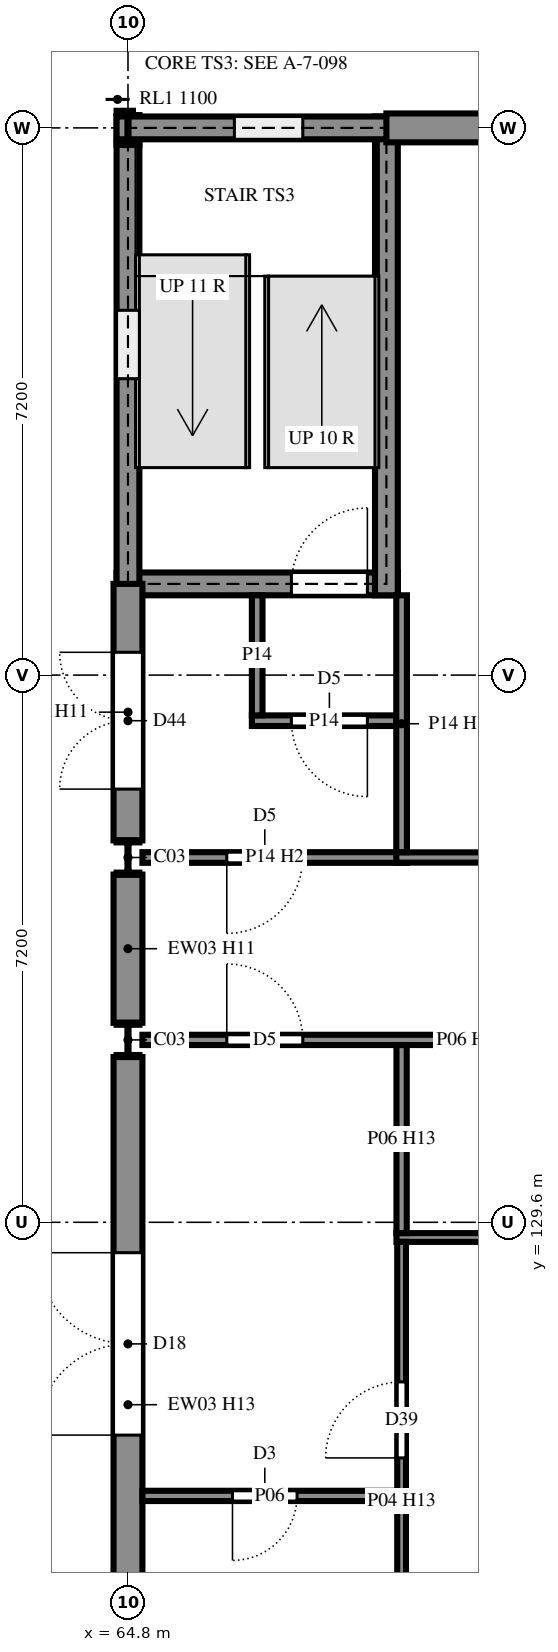
"""IFC4 building model, lengths in metres.
Left out: names, types, materials, properties, quantities, classifications, styles, units other than length and angle.
Written with IfcOpenShell. Run it as: python <this file> out.ifc"""

import sys

from ifc_helpers import new_model, si_unit, direction, frame, frame_2d, origin, origin_2d, place, context, subcontext, project, spatial, rectangle, i_section, extrude, element, fill, save


model = new_model("IFC4")
c1 = context("Model", 3, precision=1e-05, world=origin(), true_north=direction((0.0, 1.0)))
c2 = subcontext(c1, "Body", "Model", "MODEL_VIEW")
j1 = project(units=[si_unit("LENGTHUNIT", "METRE"), si_unit("PLANEANGLEUNIT", "RADIAN")], contexts=[c1])
p1 = place(None, origin())
s1 = spatial("IfcSite", under=j1, at=p1, CompositionType="ELEMENT")
p2 = place(p1, origin())
s2 = spatial("IfcBuilding", under=s1, at=p2, CompositionType="ELEMENT")
p3 = place(p2, frame((0.0, 0.0, 7.2)))
s3 = spatial("IfcBuildingStorey", under=s2, at=p3, CompositionType="ELEMENT", Elevation=7.2)
for number, where, z_axis, x_axis in (
    (1, (64.8, 132.0, 0.0), (0.0, 0.0, 1.0), (1.0, 0.0, 0.0)),
    (2, (64.8, 134.4, 0.0), (0.0, 0.0, 1.0), (1.0, 0.0, 0.0)),
    (3, (64.8, 144.0, 0.0), (0.0, 0.0, 1.0), (1.0, 0.0, 0.0)),
):
    element("IfcColumn", number, at=place(p3, frame(where, z_axis=z_axis, x_axis=x_axis)), inside=s3, PredefinedType="COLUMN", context=c2, shape_type="SweptSolid", body=[
        extrude(i_section(OverallWidth=0.3, OverallDepth=0.45, WebThickness=0.014, FlangeThickness=0.026, FilletRadius=0.027, at=origin_2d()), origin(), (0.0, 0.0, 1.0), 3.6),
    ])
p4 = place(p3, frame((64.65, 138.0, 0.0), z_axis=(0.0, 0.0, 1.0), x_axis=(1.0, 0.0, 0.0)))
e4 = element("IfcWall", 4, at=p4, inside=s3, PredefinedType="SHEAR", context=c2, shape_type="SweptSolid", body=[
    extrude(rectangle(XDim=3.7, YDim=0.3, at=frame_2d((1.85, 0.0))), origin(), (0.0, 0.0, 1.0), 3.6),
])
p5 = place(p4, frame((2.3, 0.0, 0.0)))
e5 = element("IfcOpeningElement", 5, at=p5, cuts=e4, PredefinedType="OPENING", context=c2, shape_type="SweptSolid", body=[
    extrude(rectangle(XDim=1.0, YDim=2.1, at=frame_2d((0.5, 1.05))), frame((0.0, 0.16, 0.0), z_axis=(0.0, -1.0, 0.0), x_axis=(1.0, 0.0, 0.0)), (0.0, 0.0, 1.0), 0.32),
])
p6 = place(p3, frame((68.2, 137.85, 0.0), z_axis=(0.0, 0.0, 1.0), x_axis=(0.0, 1.0, 0.0)))
e6 = element("IfcWall", 6, at=p6, inside=s3, PredefinedType="SHEAR", context=c2, shape_type="SweptSolid", body=[
    extrude(rectangle(XDim=6.3, YDim=0.3, at=frame_2d((3.15, 0.0))), origin(), (0.0, 0.0, 1.0), 3.6),
])
p7 = place(p3, frame((64.8, 144.15, 0.0), z_axis=(0.0, 0.0, 1.0), x_axis=(0.0, -1.0, 0.0)))
e7 = element("IfcWall", 7, at=p7, inside=s3, PredefinedType="SHEAR", context=c2, shape_type="SweptSolid", body=[
    extrude(rectangle(XDim=6.3, YDim=0.3, at=frame_2d((3.15, 0.0))), origin(), (0.0, 0.0, 1.0), 3.6),
])
p8 = place(p7, frame((2.55, 0.0, 0.6)))
e8 = element("IfcOpeningElement", 8, at=p8, cuts=e7, PredefinedType="OPENING", context=c2, shape_type="SweptSolid", body=[
    extrude(rectangle(XDim=0.9, YDim=2.1, at=frame_2d((0.45, 1.05))), frame((0.0, 0.16, 0.0), z_axis=(0.0, -1.0, 0.0), x_axis=(1.0, 0.0, 0.0)), (0.0, 0.0, 1.0), 0.32),
])
p9 = place(p3, frame((68.35, 144.0, 0.0), z_axis=(0.0, 0.0, 1.0), x_axis=(-1.0, 0.0, 0.0)))
e9 = element("IfcWall", 9, at=p9, inside=s3, PredefinedType="SHEAR", context=c2, shape_type="SweptSolid", body=[
    extrude(rectangle(XDim=3.7, YDim=0.3, at=frame_2d((1.85, 0.0))), origin(), (0.0, 0.0, 1.0), 3.6),
])
p10 = place(p9, frame((1.25, 0.0, 0.6)))
e10 = element("IfcOpeningElement", 10, at=p10, cuts=e9, PredefinedType="OPENING", context=c2, shape_type="SweptSolid", body=[
    extrude(rectangle(XDim=0.9, YDim=2.1, at=frame_2d((0.45, 1.05))), frame((0.0, 0.16, 0.0), z_axis=(0.0, -1.0, 0.0), x_axis=(1.0, 0.0, 0.0)), (0.0, 0.0, 1.0), 0.32),
])
p11 = place(p3, frame((71.846, 144.0, 0.0), z_axis=(0.0, 0.0, 1.0), x_axis=(-1.0, 0.0, 0.0)))
e11 = element("IfcWall", 11, at=p11, inside=s3, PredefinedType="SOLIDWALL", context=c2, shape_type="SweptSolid", body=[
    extrude(rectangle(XDim=3.646, YDim=0.38, at=frame_2d((1.823, 0.0))), origin(), (0.0, 0.0, 1.0), 3.22),
])
p12 = place(p3, frame((64.8, 138.0, 0.0), z_axis=(0.0, 0.0, 1.0), x_axis=(0.0, -1.0, 0.0)))
e12 = element("IfcWall", 12, at=p12, inside=s3, PredefinedType="SOLIDWALL", context=c2, shape_type="SweptSolid", body=[
    extrude(rectangle(XDim=3.375, YDim=0.38, at=frame_2d((1.688, 0.0))), origin(), (0.0, 0.0, 1.0), 3.22),
])
p13 = place(p12, frame((0.9, 0.0, 0.0)))
e13 = element("IfcOpeningElement", 13, at=p13, cuts=e12, PredefinedType="OPENING", context=c2, shape_type="SweptSolid", body=[
    extrude(rectangle(XDim=1.8, YDim=2.1, at=frame_2d((0.9, 1.05))), frame((0.0, 0.2, 0.0), z_axis=(0.0, -1.0, 0.0), x_axis=(1.0, 0.0, 0.0)), (0.0, 0.0, 1.0), 0.4),
])
p14 = place(p3, frame((64.8, 134.175, 0.0), z_axis=(0.0, 0.0, 1.0), x_axis=(0.0, -1.0, 0.0)))
e14 = element("IfcWall", 14, at=p14, inside=s3, PredefinedType="SOLIDWALL", context=c2, shape_type="SweptSolid", body=[
    extrude(rectangle(XDim=1.95, YDim=0.38, at=frame_2d((0.975, 0.0))), origin(), (0.0, 0.0, 1.0), 3.22),
])
p15 = place(p3, frame((64.8, 131.775, 0.0), z_axis=(0.0, 0.0, 1.0), x_axis=(0.0, -1.0, 0.0)))
e15 = element("IfcWall", 15, at=p15, inside=s3, PredefinedType="SOLIDWALL", context=c2, shape_type="SweptSolid", body=[
    extrude(rectangle(XDim=9.15, YDim=0.38, at=frame_2d((4.575, 0.0))), origin(), (0.0, 0.0, 1.0), 3.02),
])
p16 = place(p15, frame((2.575, 0.0, 0.0)))
e16 = element("IfcOpeningElement", 16, at=p16, cuts=e15, PredefinedType="OPENING", context=c2, shape_type="SweptSolid", body=[
    extrude(rectangle(XDim=2.4, YDim=2.4, at=frame_2d((1.2, 1.2))), frame((0.0, 0.2, 0.0), z_axis=(0.0, -1.0, 0.0), x_axis=(1.0, 0.0, 0.0)), (0.0, 0.0, 1.0), 0.4),
])
p17 = place(p3, frame((64.99, 126.0, 0.0), z_axis=(0.0, 0.0, 1.0), x_axis=(1.0, 0.0, 0.0)))
e17 = element("IfcWall", 17, at=p17, inside=s3, PredefinedType="PARTITIONING", context=c2, shape_type="SweptSolid", body=[
    extrude(rectangle(XDim=3.353, YDim=0.135, at=frame_2d((1.676, 0.0))), origin(), (0.0, 0.0, 1.0), 3.42),
])
p18 = place(p17, frame((1.185, 0.0, 0.0)))
e18 = element("IfcOpeningElement", 18, at=p18, cuts=e17, PredefinedType="OPENING", context=c2, shape_type="SweptSolid", body=[
    extrude(rectangle(XDim=0.85, YDim=2.1, at=frame_2d((0.425, 1.05))), frame((0.0, 0.077, 0.0), z_axis=(0.0, -1.0, 0.0), x_axis=(1.0, 0.0, 0.0)), (0.0, 0.0, 1.0), 0.155),
])
p19 = place(p3, frame((68.333, 129.4, 0.0), z_axis=(0.0, 0.0, 1.0), x_axis=(1.0, 0.0, 0.0)))
e19 = element("IfcWall", 19, at=p19, inside=s3, PredefinedType="PARTITIONING", context=c2, shape_type="SweptSolid", body=[
    extrude(rectangle(XDim=5.135, YDim=0.115, at=frame_2d((2.567, 0.0))), origin(), (0.0, 0.0, 1.0), 3.42),
])
p20 = place(p3, frame((64.99, 132.0, 0.0), z_axis=(0.0, 0.0, 1.0), x_axis=(1.0, 0.0, 0.0)))
e20 = element("IfcWall", 20, at=p20, inside=s3, PredefinedType="PARTITIONING", context=c2, shape_type="SweptSolid", body=[
    extrude(rectangle(XDim=28.41, YDim=0.135, at=frame_2d((14.205, 0.0))), origin(), (0.0, 0.0, 1.0), 3.12),
])
p21 = place(p20, frame((5.485, 0.0, 0.0)))
e21 = element("IfcOpeningElement", 21, at=p21, cuts=e20, PredefinedType="OPENING", context=c2, shape_type="SweptSolid", body=[
    extrude(rectangle(XDim=0.85, YDim=2.1, at=frame_2d((0.425, 1.05))), frame((0.0, 0.077, 0.0), z_axis=(0.0, -1.0, 0.0), x_axis=(1.0, 0.0, 0.0)), (0.0, 0.0, 1.0), 0.155),
])
p22 = place(p20, frame((12.91, 0.0, 0.0)))
e22 = element("IfcOpeningElement", 22, at=p22, cuts=e20, PredefinedType="OPENING", context=c2, shape_type="SweptSolid", body=[
    extrude(rectangle(XDim=1.0, YDim=2.4, at=frame_2d((0.5, 1.2))), frame((0.0, 0.077, 0.0), z_axis=(0.0, -1.0, 0.0), x_axis=(1.0, 0.0, 0.0)), (0.0, 0.0, 1.0), 0.155),
])
p23 = place(p20, frame((23.085, 0.0, 0.0)))
e23 = element("IfcOpeningElement", 23, at=p23, cuts=e20, PredefinedType="OPENING", context=c2, shape_type="SweptSolid", body=[
    extrude(rectangle(XDim=0.85, YDim=2.1, at=frame_2d((0.425, 1.05))), frame((0.0, 0.077, 0.0), z_axis=(0.0, -1.0, 0.0), x_axis=(1.0, 0.0, 0.0)), (0.0, 0.0, 1.0), 0.155),
])
p24 = place(p20, frame((1.11, 0.0, 0.0)))
e24 = element("IfcOpeningElement", 24, at=p24, cuts=e20, PredefinedType="OPENING", context=c2, shape_type="SweptSolid", body=[
    extrude(rectangle(XDim=1.0, YDim=2.1, at=frame_2d((0.5, 1.05))), frame((0.0, 0.077, 0.0), z_axis=(0.0, -1.0, 0.0), x_axis=(1.0, 0.0, 0.0)), (0.0, 0.0, 1.0), 0.155),
])
p25 = place(p3, frame((64.99, 134.4, 0.0), z_axis=(0.0, 0.0, 1.0), x_axis=(1.0, 0.0, 0.0)))
e25 = element("IfcWall", 25, at=p25, inside=s3, PredefinedType="PARTITIONING", context=c2, shape_type="SweptSolid", body=[
    extrude(rectangle(XDim=3.48, YDim=0.14, at=frame_2d((1.74, 0.0))), origin(), (0.0, 0.0, 1.0), 3.12),
])
p26 = place(p25, frame((1.11, 0.0, 0.0)))
e26 = element("IfcOpeningElement", 26, at=p26, cuts=e25, PredefinedType="OPENING", context=c2, shape_type="SweptSolid", body=[
    extrude(rectangle(XDim=1.0, YDim=2.1, at=frame_2d((0.5, 1.05))), frame((0.0, 0.08, 0.0), z_axis=(0.0, -1.0, 0.0), x_axis=(1.0, 0.0, 0.0)), (0.0, 0.0, 1.0), 0.16),
])
p27 = place(p3, frame((68.33, 134.4, 0.0), z_axis=(0.0, 0.0, 1.0), x_axis=(1.0, 0.0, 0.0)))
e27 = element("IfcWall", 27, at=p27, inside=s3, PredefinedType="PARTITIONING", context=c2, shape_type="SweptSolid", body=[
    extrude(rectangle(XDim=25.07, YDim=0.135, at=frame_2d((12.535, 0.0))), origin(), (0.0, 0.0, 1.0), 3.12),
])
p28 = place(p27, frame((6.37, 0.0, 0.0)))
e28 = element("IfcOpeningElement", 28, at=p28, cuts=e27, PredefinedType="OPENING", context=c2, shape_type="SweptSolid", body=[
    extrude(rectangle(XDim=1.8, YDim=2.1, at=frame_2d((0.9, 1.05))), frame((0.0, 0.077, 0.0), z_axis=(0.0, -1.0, 0.0), x_axis=(1.0, 0.0, 0.0)), (0.0, 0.0, 1.0), 0.155),
])
p29 = place(p27, frame((13.57, 0.0, 0.0)))
e29 = element("IfcOpeningElement", 29, at=p29, cuts=e27, PredefinedType="OPENING", context=c2, shape_type="SweptSolid", body=[
    extrude(rectangle(XDim=1.8, YDim=2.1, at=frame_2d((0.9, 1.05))), frame((0.0, 0.077, 0.0), z_axis=(0.0, -1.0, 0.0), x_axis=(1.0, 0.0, 0.0)), (0.0, 0.0, 1.0), 0.155),
])
p30 = place(p27, frame((20.17, 0.0, 0.0)))
e30 = element("IfcOpeningElement", 30, at=p30, cuts=e27, PredefinedType="OPENING", context=c2, shape_type="SweptSolid", body=[
    extrude(rectangle(XDim=1.8, YDim=2.1, at=frame_2d((0.9, 1.05))), frame((0.0, 0.077, 0.0), z_axis=(0.0, -1.0, 0.0), x_axis=(1.0, 0.0, 0.0)), (0.0, 0.0, 1.0), 0.155),
])
p31 = place(p3, frame((66.43, 136.2, 0.0), z_axis=(0.0, 0.0, 1.0), x_axis=(1.0, 0.0, 0.0)))
e31 = element("IfcWall", 31, at=p31, inside=s3, PredefinedType="PARTITIONING", context=c2, shape_type="SweptSolid", body=[
    extrude(rectangle(XDim=1.9, YDim=0.14, at=frame_2d((0.95, 0.0))), origin(), (0.0, 0.0, 1.0), 3.42),
])
p32 = place(p31, frame((0.52, 0.0, 0.0)))
e32 = element("IfcOpeningElement", 32, at=p32, cuts=e31, PredefinedType="OPENING", context=c2, shape_type="SweptSolid", body=[
    extrude(rectangle(XDim=1.0, YDim=2.1, at=frame_2d((0.5, 1.05))), frame((0.0, 0.08, 0.0), z_axis=(0.0, -1.0, 0.0), x_axis=(1.0, 0.0, 0.0)), (0.0, 0.0, 1.0), 0.16),
])
p33 = place(p3, frame((66.5, 136.27, 0.0), z_axis=(0.0, 0.0, 1.0), x_axis=(0.0, 1.0, 0.0)))
e33 = element("IfcWall", 33, at=p33, inside=s3, PredefinedType="PARTITIONING", context=c2, shape_type="SweptSolid", body=[
    extrude(rectangle(XDim=1.58, YDim=0.14, at=frame_2d((0.79, 0.0))), origin(), (0.0, 0.0, 1.0), 3.42),
])
p34 = place(p3, frame((68.4, 122.525, 0.0), z_axis=(0.0, 0.0, 1.0), x_axis=(0.0, 1.0, 0.0)))
e34 = element("IfcWall", 34, at=p34, inside=s3, PredefinedType="PARTITIONING", context=c2, shape_type="SweptSolid", body=[
    extrude(rectangle(XDim=6.818, YDim=0.115, at=frame_2d((3.409, 0.0))), origin(), (0.0, 0.0, 1.0), 3.02),
])
p35 = place(p34, frame((3.975, 0.0, 0.0)))
e35 = element("IfcOpeningElement", 35, at=p35, cuts=e34, PredefinedType="OPENING", context=c2, shape_type="SweptSolid", body=[
    extrude(rectangle(XDim=1.0, YDim=2.1, at=frame_2d((0.5, 1.05))), frame((0.0, 0.067, 0.0), z_axis=(0.0, -1.0, 0.0), x_axis=(1.0, 0.0, 0.0)), (0.0, 0.0, 1.0), 0.135),
])
p36 = place(p3, frame((68.4, 129.458, 0.0), z_axis=(0.0, 0.0, 1.0), x_axis=(0.0, 1.0, 0.0)))
e36 = element("IfcWall", 36, at=p36, inside=s3, PredefinedType="PARTITIONING", context=c2, shape_type="SweptSolid", body=[
    extrude(rectangle(XDim=2.475, YDim=0.135, at=frame_2d((1.238, 0.0))), origin(), (0.0, 0.0, 1.0), 3.02),
])
p37 = place(p3, frame((68.4, 134.47, 0.0), z_axis=(0.0, 0.0, 1.0), x_axis=(0.0, 1.0, 0.0)))
e37 = element("IfcWall", 37, at=p37, inside=s3, PredefinedType="PARTITIONING", context=c2, shape_type="SweptSolid", body=[
    extrude(rectangle(XDim=3.38, YDim=0.14, at=frame_2d((1.69, 0.0))), origin(), (0.0, 0.0, 1.0), 3.02),
])
p38 = place(p13, frame((1.8, 0.0, 0.0), z_axis=(0.0, 0.0, 1.0), x_axis=(-1.0, 0.0, 0.0)))
e38 = element("IfcDoor", 38, at=p38, inside=s3, OperationType="DOUBLE_DOOR_SINGLE_SWING", PredefinedType="DOOR", context=c2, shape_type="SweptSolid", body=[
    extrude(rectangle(XDim=1.8, YDim=2.1, at=frame_2d((0.9, 1.05))), frame((0.0, 0.025, 0.0), z_axis=(0.0, -1.0, 0.0), x_axis=(1.0, 0.0, 0.0)), (0.0, 0.0, 1.0), 0.05),
])
fill(e13, e38)
p39 = place(p16, frame((2.4, 0.0, 0.0), z_axis=(0.0, 0.0, 1.0), x_axis=(-1.0, 0.0, 0.0)))
e39 = element("IfcDoor", 39, at=p39, inside=s3, OperationType="DOUBLE_DOOR_SINGLE_SWING", PredefinedType="DOOR", context=c2, shape_type="SweptSolid", body=[
    extrude(rectangle(XDim=2.4, YDim=2.4, at=frame_2d((1.2, 1.2))), frame((0.0, 0.025, 0.0), z_axis=(0.0, -1.0, 0.0), x_axis=(1.0, 0.0, 0.0)), (0.0, 0.0, 1.0), 0.05),
])
fill(e16, e39)
p40 = place(p10, origin())
e40 = element("IfcWindow", 40, at=p40, inside=s3, PartitioningType="SINGLE_PANEL", PredefinedType="WINDOW", context=c2, shape_type="SweptSolid", body=[
    extrude(rectangle(XDim=0.9, YDim=2.1, at=frame_2d((0.45, 1.05))), frame((0.0, 0.03, 0.0), z_axis=(0.0, -1.0, 0.0), x_axis=(1.0, 0.0, 0.0)), (0.0, 0.0, 1.0), 0.06),
])
fill(e10, e40)
p41 = place(p8, origin())
e41 = element("IfcWindow", 41, at=p41, inside=s3, PartitioningType="SINGLE_PANEL", PredefinedType="WINDOW", context=c2, shape_type="SweptSolid", body=[
    extrude(rectangle(XDim=0.9, YDim=2.1, at=frame_2d((0.45, 1.05))), frame((0.0, 0.03, 0.0), z_axis=(0.0, -1.0, 0.0), x_axis=(1.0, 0.0, 0.0)), (0.0, 0.0, 1.0), 0.06),
])
fill(e8, e41)
p42 = place(p18, frame((0.85, 0.0, 0.0), z_axis=(0.0, 0.0, 1.0), x_axis=(-1.0, 0.0, 0.0)))
e42 = element("IfcDoor", 42, at=p42, inside=s3, OperationType="SINGLE_SWING_LEFT", PredefinedType="DOOR", context=c2, shape_type="SweptSolid", body=[
    extrude(rectangle(XDim=0.85, YDim=2.1, at=frame_2d((0.425, 1.05))), frame((0.0, 0.025, 0.0), z_axis=(0.0, -1.0, 0.0), x_axis=(1.0, 0.0, 0.0)), (0.0, 0.0, 1.0), 0.05),
])
fill(e18, e42)
p43 = place(p24, origin())
e43 = element("IfcDoor", 43, at=p43, inside=s3, OperationType="SINGLE_SWING_RIGHT", PredefinedType="DOOR", context=c2, shape_type="SweptSolid", body=[
    extrude(rectangle(XDim=1.0, YDim=2.1, at=frame_2d((0.5, 1.05))), frame((0.0, 0.025, 0.0), z_axis=(0.0, -1.0, 0.0), x_axis=(1.0, 0.0, 0.0)), (0.0, 0.0, 1.0), 0.05),
])
fill(e24, e43)
p44 = place(p26, frame((1.0, 0.0, 0.0), z_axis=(0.0, 0.0, 1.0), x_axis=(-1.0, 0.0, 0.0)))
e44 = element("IfcDoor", 44, at=p44, inside=s3, OperationType="SINGLE_SWING_LEFT", PredefinedType="DOOR", context=c2, shape_type="SweptSolid", body=[
    extrude(rectangle(XDim=1.0, YDim=2.1, at=frame_2d((0.5, 1.05))), frame((0.0, 0.025, 0.0), z_axis=(0.0, -1.0, 0.0), x_axis=(1.0, 0.0, 0.0)), (0.0, 0.0, 1.0), 0.05),
])
fill(e26, e44)
p45 = place(p32, frame((1.0, 0.0, 0.0), z_axis=(0.0, 0.0, 1.0), x_axis=(-1.0, 0.0, 0.0)))
e45 = element("IfcDoor", 45, at=p45, inside=s3, OperationType="SINGLE_SWING_RIGHT", PredefinedType="DOOR", context=c2, shape_type="SweptSolid", body=[
    extrude(rectangle(XDim=1.0, YDim=2.1, at=frame_2d((0.5, 1.05))), frame((0.0, 0.025, 0.0), z_axis=(0.0, -1.0, 0.0), x_axis=(1.0, 0.0, 0.0)), (0.0, 0.0, 1.0), 0.05),
])
fill(e32, e45)
p46 = place(p35, origin())
e46 = element("IfcDoor", 46, at=p46, inside=s3, OperationType="SINGLE_SWING_RIGHT", PredefinedType="DOOR", context=c2, shape_type="SweptSolid", body=[
    extrude(rectangle(XDim=1.0, YDim=2.1, at=frame_2d((0.5, 1.05))), frame((0.0, 0.025, 0.0), z_axis=(0.0, -1.0, 0.0), x_axis=(1.0, 0.0, 0.0)), (0.0, 0.0, 1.0), 0.05),
])
fill(e35, e46)
p47 = place(p5, origin())
e47 = element("IfcDoor", 47, at=p47, inside=s3, OperationType="SINGLE_SWING_LEFT", PredefinedType="DOOR", context=c2, shape_type="SweptSolid", body=[
    extrude(rectangle(XDim=1.0, YDim=2.1, at=frame_2d((0.5, 1.05))), frame((0.0, 0.025, 0.0), z_axis=(0.0, -1.0, 0.0), x_axis=(1.0, 0.0, 0.0)), (0.0, 0.0, 1.0), 0.05),
])
fill(e5, e47)
save(model, sys.argv[1])
